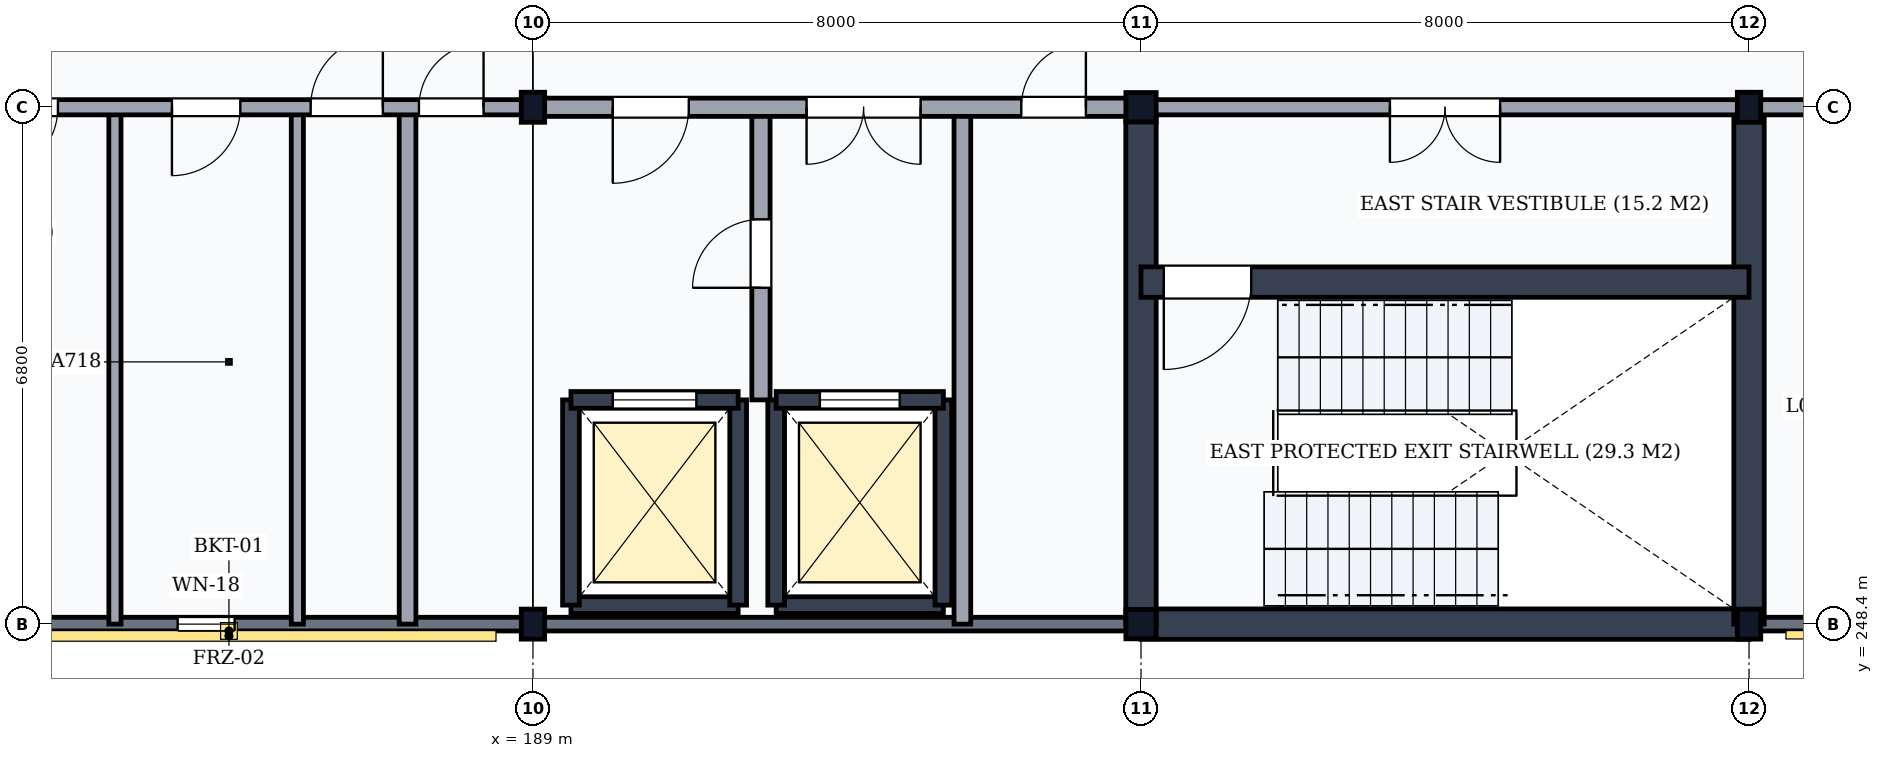
"""IFC4 building model, lengths in metres.
Left out: names, types, materials, properties, quantities, classifications, styles, units other than length and angle.
Written with IfcOpenShell. Run it as: python <this file> out.ifc"""

import sys

from ifc_helpers import new_model, si_unit, direction, frame, frame_2d, origin, origin_2d, place, context, subcontext, project, spatial, rectangle, i_section, extrude, element, fill, save


model = new_model("IFC4")
c1 = context("Model", 3, precision=1e-05, world=origin(), true_north=direction((0.0, 1.0)))
c2 = subcontext(c1, "Body", "Model", "MODEL_VIEW")
j1 = project(units=[si_unit("LENGTHUNIT", "METRE"), si_unit("PLANEANGLEUNIT", "RADIAN")], contexts=[c1])
p1 = place(None, origin())
s1 = spatial("IfcSite", under=j1, at=p1, CompositionType="ELEMENT")
p2 = place(p1, origin())
s2 = spatial("IfcBuilding", under=s1, at=p2, CompositionType="ELEMENT")
p3 = place(p2, frame((0.0, 0.0, 32.1)))
s3 = spatial("IfcBuildingStorey", under=s2, at=p3, CompositionType="ELEMENT", Elevation=32.1)
for number, where, z_axis, x_axis in (
    (1, (189.0, 248.4, 0.0), (0.0, 0.0, 1.0), (1.0, 0.0, 0.0)),
    (2, (189.0, 255.2, 0.0), (0.0, 0.0, 1.0), (1.0, 0.0, 0.0)),
):
    element("IfcColumn", number, at=place(p3, frame(where, z_axis=z_axis, x_axis=x_axis)), inside=s3, PredefinedType="COLUMN", context=c2, shape_type="SweptSolid", body=[
        extrude(i_section(OverallWidth=0.308, OverallDepth=0.395, WebThickness=0.021, FlangeThickness=0.04, FilletRadius=0.027, at=origin_2d()), origin(), (0.0, 0.0, 1.0), 3.9),
    ])
for number, where, z_axis, x_axis in (
    (3, (197.0, 248.4, 0.0), (0.0, 0.0, 1.0), (1.0, 0.0, 0.0)),
    (4, (197.0, 255.2, 0.0), (0.0, 0.0, 1.0), (1.0, 0.0, 0.0)),
):
    element("IfcColumn", number, at=place(p3, frame(where, z_axis=z_axis, x_axis=x_axis)), inside=s3, PredefinedType="COLUMN", context=c2, shape_type="SweptSolid", body=[
        extrude(i_section(OverallWidth=0.398, OverallDepth=0.387, WebThickness=0.021, FlangeThickness=0.033, FilletRadius=0.015, at=origin_2d()), origin(), (0.0, 0.0, 1.0), 3.9),
    ])
for number, where, z_axis, x_axis in (
    (5, (205.0, 248.4, 0.0), (0.0, 0.0, 1.0), (1.0, 0.0, 0.0)),
    (6, (205.0, 255.2, 0.0), (0.0, 0.0, 1.0), (1.0, 0.0, 0.0)),
):
    element("IfcColumn", number, at=place(p3, frame(where, z_axis=z_axis, x_axis=x_axis)), inside=s3, PredefinedType="COLUMN", context=c2, shape_type="SweptSolid", body=[
        extrude(i_section(OverallWidth=0.308, OverallDepth=0.395, WebThickness=0.021, FlangeThickness=0.04, FilletRadius=0.027, at=origin_2d()), origin(), (0.0, 0.0, 1.0), 3.9),
    ])
p4 = place(p3, frame((181.006, 248.4, 0.0), z_axis=(0.0, 0.0, 1.0), x_axis=(1.0, 0.0, 0.0)))
e7 = element("IfcWall", 7, at=p4, inside=s3, PredefinedType="SOLIDWALL", context=c2, shape_type="SweptSolid", body=[
    extrude(rectangle(XDim=7.988, YDim=0.18, at=frame_2d((3.994, 0.0))), origin(), (0.0, 0.0, 1.0), 3.368),
])
p5 = place(p4, frame((3.319, 0.0, 0.85)))
e8 = element("IfcOpeningElement", 8, at=p5, cuts=e7, PredefinedType="OPENING", context=c2, shape_type="SweptSolid", body=[
    extrude(rectangle(XDim=0.75, YDim=2.0, at=frame_2d((0.375, 1.0))), frame((0.0, 0.105, 0.0), z_axis=(0.0, -1.0, 0.0), x_axis=(1.0, 0.0, 0.0)), (0.0, 0.0, 1.0), 0.21),
])
p6 = place(p3, frame((189.006, 248.4, 0.0), z_axis=(0.0, 0.0, 1.0), x_axis=(1.0, 0.0, 0.0)))
e9 = element("IfcWall", 9, at=p6, inside=s3, PredefinedType="SOLIDWALL", context=c2, shape_type="SweptSolid", body=[
    extrude(rectangle(XDim=7.988, YDim=0.18, at=frame_2d((3.994, 0.0))), origin(), (0.0, 0.0, 1.0), 3.368),
])
p7 = place(p3, frame((205.006, 248.4, 0.0), z_axis=(0.0, 0.0, 1.0), x_axis=(1.0, 0.0, 0.0)))
e10 = element("IfcWall", 10, at=p7, inside=s3, PredefinedType="SOLIDWALL", context=c2, shape_type="SweptSolid", body=[
    extrude(rectangle(XDim=7.988, YDim=0.18, at=frame_2d((3.994, 0.0))), origin(), (0.0, 0.0, 1.0), 3.368),
])
p8 = place(p7, frame((3.094, 0.0, 0.95)))
e11 = element("IfcOpeningElement", 11, at=p8, cuts=e10, PredefinedType="OPENING", context=c2, shape_type="SweptSolid", body=[
    extrude(rectangle(XDim=1.8, YDim=2.0, at=frame_2d((0.9, 1.0))), frame((0.0, 0.105, 0.0), z_axis=(0.0, -1.0, 0.0), x_axis=(1.0, 0.0, 0.0)), (0.0, 0.0, 1.0), 0.21),
])
p9 = place(p3, frame((197.0, 248.4, 0.0), z_axis=(0.0, 0.0, 1.0), x_axis=(1.0, 0.0, 0.0)))
e12 = element("IfcWall", 12, at=p9, inside=s3, PredefinedType="SHEAR", context=c2, shape_type="SweptSolid", body=[
    extrude(rectangle(XDim=8.0, YDim=0.4, at=frame_2d((4.0, 0.0))), origin(), (0.0, 0.0, 1.0), 3.68),
])
for number, where, z_axis, x_axis in (
    (13, (197.0, 248.4, 0.0), (0.0, 0.0, 1.0), (0.0, 1.0, 0.0)),
    (14, (205.0, 248.4, 0.0), (0.0, 0.0, 1.0), (0.0, 1.0, 0.0)),
):
    element("IfcWall", number, at=place(p3, frame(where, z_axis=z_axis, x_axis=x_axis)), inside=s3, PredefinedType="SHEAR", context=c2, shape_type="SweptSolid", body=[
        extrude(rectangle(XDim=6.8, YDim=0.4, at=frame_2d((3.4, 0.0))), origin(), (0.0, 0.0, 1.0), 3.68),
    ])
p10 = place(p3, frame((197.0, 252.9, 0.0), z_axis=(0.0, 0.0, 1.0), x_axis=(1.0, 0.0, 0.0)))
e15 = element("IfcWall", 15, at=p10, inside=s3, PredefinedType="SHEAR", context=c2, shape_type="SweptSolid", body=[
    extrude(rectangle(XDim=8.0, YDim=0.4, at=frame_2d((4.0, 0.0))), origin(), (0.0, 0.0, 1.0), 3.68),
])
p11 = place(p10, frame((0.3, 0.0, 0.0)))
e16 = element("IfcOpeningElement", 16, at=p11, cuts=e15, PredefinedType="OPENING", context=c2, shape_type="SweptSolid", body=[
    extrude(rectangle(XDim=1.15, YDim=2.15, at=frame_2d((0.575, 1.075))), frame((0.0, 0.215, 0.0), z_axis=(0.0, -1.0, 0.0), x_axis=(1.0, 0.0, 0.0)), (0.0, 0.0, 1.0), 0.43),
])
p12 = place(p3, frame((197.0, 255.2, 0.0), z_axis=(0.0, 0.0, 1.0), x_axis=(1.0, 0.0, 0.0)))
e17 = element("IfcWall", 17, at=p12, inside=s3, PredefinedType="PARTITIONING", context=c2, shape_type="SweptSolid", body=[
    extrude(rectangle(XDim=8.0, YDim=0.2, at=frame_2d((4.0, 0.0))), origin(), (0.0, 0.0, 1.0), 3.078),
])
p13 = place(p12, frame((3.275, 0.0, 0.0)))
e18 = element("IfcOpeningElement", 18, at=p13, cuts=e17, PredefinedType="OPENING", context=c2, shape_type="SweptSolid", body=[
    extrude(rectangle(XDim=1.45, YDim=2.2, at=frame_2d((0.725, 1.1))), frame((0.0, 0.115, 0.0), z_axis=(0.0, -1.0, 0.0), x_axis=(1.0, 0.0, 0.0)), (0.0, 0.0, 1.0), 0.23),
])
p14 = place(p3, frame((189.5, 248.65, 0.0), z_axis=(0.0, 0.0, 1.0), x_axis=(1.0, 0.0, 0.0)))
e19 = element("IfcWall", 19, at=p14, inside=s3, PredefinedType="SHEAR", context=c2, shape_type="SweptSolid", body=[
    extrude(rectangle(XDim=2.2, YDim=0.22, at=frame_2d((1.1, 0.0))), origin(), (0.0, 0.0, 1.0), 3.68),
])
for number, where, z_axis, x_axis in (
    (20, (189.5, 248.65, 0.0), (0.0, 0.0, 1.0), (0.0, 1.0, 0.0)),
    (21, (191.7, 248.65, 0.0), (0.0, 0.0, 1.0), (0.0, 1.0, 0.0)),
):
    element("IfcWall", number, at=place(p3, frame(where, z_axis=z_axis, x_axis=x_axis)), inside=s3, PredefinedType="SHEAR", context=c2, shape_type="SweptSolid", body=[
        extrude(rectangle(XDim=2.7, YDim=0.22, at=frame_2d((1.35, 0.0))), origin(), (0.0, 0.0, 1.0), 3.68),
    ])
p15 = place(p3, frame((189.5, 251.35, 0.0), z_axis=(0.0, 0.0, 1.0), x_axis=(1.0, 0.0, 0.0)))
e22 = element("IfcWall", 22, at=p15, inside=s3, PredefinedType="SHEAR", context=c2, shape_type="SweptSolid", body=[
    extrude(rectangle(XDim=2.2, YDim=0.22, at=frame_2d((1.1, 0.0))), origin(), (0.0, 0.0, 1.0), 3.68),
])
p16 = place(p15, frame((0.55, 0.0, 0.0)))
e23 = element("IfcOpeningElement", 23, at=p16, cuts=e22, PredefinedType="OPENING", context=c2, shape_type="SweptSolid", body=[
    extrude(rectangle(XDim=1.1, YDim=2.15, at=frame_2d((0.55, 1.075))), frame((0.0, 0.125, 0.0), z_axis=(0.0, -1.0, 0.0), x_axis=(1.0, 0.0, 0.0)), (0.0, 0.0, 1.0), 0.25),
])
p17 = place(p3, frame((192.2, 248.65, 0.0), z_axis=(0.0, 0.0, 1.0), x_axis=(1.0, 0.0, 0.0)))
e24 = element("IfcWall", 24, at=p17, inside=s3, PredefinedType="SHEAR", context=c2, shape_type="SweptSolid", body=[
    extrude(rectangle(XDim=2.2, YDim=0.22, at=frame_2d((1.1, 0.0))), origin(), (0.0, 0.0, 1.0), 3.68),
])
for number, where, z_axis, x_axis in (
    (25, (192.2, 248.65, 0.0), (0.0, 0.0, 1.0), (0.0, 1.0, 0.0)),
    (26, (194.4, 248.65, 0.0), (0.0, 0.0, 1.0), (0.0, 1.0, 0.0)),
):
    element("IfcWall", number, at=place(p3, frame(where, z_axis=z_axis, x_axis=x_axis)), inside=s3, PredefinedType="SHEAR", context=c2, shape_type="SweptSolid", body=[
        extrude(rectangle(XDim=2.7, YDim=0.22, at=frame_2d((1.35, 0.0))), origin(), (0.0, 0.0, 1.0), 3.68),
    ])
p18 = place(p3, frame((192.2, 251.35, 0.0), z_axis=(0.0, 0.0, 1.0), x_axis=(1.0, 0.0, 0.0)))
e27 = element("IfcWall", 27, at=p18, inside=s3, PredefinedType="SHEAR", context=c2, shape_type="SweptSolid", body=[
    extrude(rectangle(XDim=2.2, YDim=0.22, at=frame_2d((1.1, 0.0))), origin(), (0.0, 0.0, 1.0), 3.68),
])
p19 = place(p18, frame((0.575, 0.0, 0.0)))
e28 = element("IfcOpeningElement", 28, at=p19, cuts=e27, PredefinedType="OPENING", context=c2, shape_type="SweptSolid", body=[
    extrude(rectangle(XDim=1.05, YDim=2.15, at=frame_2d((0.525, 1.075))), frame((0.0, 0.125, 0.0), z_axis=(0.0, -1.0, 0.0), x_axis=(1.0, 0.0, 0.0)), (0.0, 0.0, 1.0), 0.25),
])
p20 = place(p3, frame((192.0, 251.35, 0.0), z_axis=(0.0, 0.0, 1.0), x_axis=(0.0, 1.0, 0.0)))
e29 = element("IfcWall", 29, at=p20, inside=s3, PredefinedType="PARTITIONING", context=c2, shape_type="SweptSolid", body=[
    extrude(rectangle(XDim=3.85, YDim=0.24, at=frame_2d((1.925, 0.0))), origin(), (0.0, 0.0, 1.0), 3.68),
])
p21 = place(p20, frame((1.475, 0.0, 0.0)))
e30 = element("IfcOpeningElement", 30, at=p21, cuts=e29, PredefinedType="OPENING", context=c2, shape_type="SweptSolid", body=[
    extrude(rectangle(XDim=0.9, YDim=2.1, at=frame_2d((0.45, 1.05))), frame((0.0, 0.135, 0.0), z_axis=(0.0, -1.0, 0.0), x_axis=(1.0, 0.0, 0.0)), (0.0, 0.0, 1.0), 0.27),
])
p22 = place(p3, frame((194.65, 248.4, 0.0), z_axis=(0.0, 0.0, 1.0), x_axis=(0.0, 1.0, 0.0)))
e31 = element("IfcWall", 31, at=p22, inside=s3, PredefinedType="PARTITIONING", context=c2, shape_type="SweptSolid", body=[
    extrude(rectangle(XDim=6.8, YDim=0.22, at=frame_2d((3.4, 0.0))), origin(), (0.0, 0.0, 1.0), 3.68),
])
for number, where, z_axis, x_axis in (
    (32, (183.5, 248.4, 0.0), (0.0, 0.0, 1.0), (0.0, 1.0, 0.0)),
    (33, (185.9, 248.4, 0.0), (0.0, 0.0, 1.0), (0.0, 1.0, 0.0)),
):
    element("IfcWall", number, at=place(p3, frame(where, z_axis=z_axis, x_axis=x_axis)), inside=s3, PredefinedType="PARTITIONING", context=c2, shape_type="SweptSolid", body=[
        extrude(rectangle(XDim=6.8, YDim=0.16, at=frame_2d((3.4, 0.0))), origin(), (0.0, 0.0, 1.0), 3.68),
    ])
p23 = place(p3, frame((187.35, 248.4, 0.0), z_axis=(0.0, 0.0, 1.0), x_axis=(0.0, 1.0, 0.0)))
e34 = element("IfcWall", 34, at=p23, inside=s3, PredefinedType="PARTITIONING", context=c2, shape_type="SweptSolid", body=[
    extrude(rectangle(XDim=6.8, YDim=0.22, at=frame_2d((3.4, 0.0))), origin(), (0.0, 0.0, 1.0), 3.68),
])
p24 = place(p3, frame((181.0, 255.2, 0.0), z_axis=(0.0, 0.0, 1.0), x_axis=(1.0, 0.0, 0.0)))
e35 = element("IfcWall", 35, at=p24, inside=s3, PredefinedType="PARTITIONING", context=c2, shape_type="SweptSolid", body=[
    extrude(rectangle(XDim=8.0, YDim=0.2, at=frame_2d((4.0, 0.0))), origin(), (0.0, 0.0, 1.0), 3.078),
])
p25 = place(p24, frame((0.85, 0.0, 0.0)))
e36 = element("IfcOpeningElement", 36, at=p25, cuts=e35, PredefinedType="OPENING", context=c2, shape_type="SweptSolid", body=[
    extrude(rectangle(XDim=0.9, YDim=2.1, at=frame_2d((0.45, 1.05))), frame((0.0, 0.115, 0.0), z_axis=(0.0, -1.0, 0.0), x_axis=(1.0, 0.0, 0.0)), (0.0, 0.0, 1.0), 0.23),
])
p26 = place(p24, frame((3.25, 0.0, 0.0)))
e37 = element("IfcOpeningElement", 37, at=p26, cuts=e35, PredefinedType="OPENING", context=c2, shape_type="SweptSolid", body=[
    extrude(rectangle(XDim=0.9, YDim=2.1, at=frame_2d((0.45, 1.05))), frame((0.0, 0.115, 0.0), z_axis=(0.0, -1.0, 0.0), x_axis=(1.0, 0.0, 0.0)), (0.0, 0.0, 1.0), 0.23),
])
p27 = place(p24, frame((5.075, 0.0, 0.0)))
e38 = element("IfcOpeningElement", 38, at=p27, cuts=e35, PredefinedType="OPENING", context=c2, shape_type="SweptSolid", body=[
    extrude(rectangle(XDim=0.95, YDim=2.1, at=frame_2d((0.475, 1.05))), frame((0.0, 0.115, 0.0), z_axis=(0.0, -1.0, 0.0), x_axis=(1.0, 0.0, 0.0)), (0.0, 0.0, 1.0), 0.23),
])
p28 = place(p24, frame((6.5, 0.0, 0.0)))
e39 = element("IfcOpeningElement", 39, at=p28, cuts=e35, PredefinedType="OPENING", context=c2, shape_type="SweptSolid", body=[
    extrude(rectangle(XDim=0.85, YDim=2.1, at=frame_2d((0.425, 1.05))), frame((0.0, 0.115, 0.0), z_axis=(0.0, -1.0, 0.0), x_axis=(1.0, 0.0, 0.0)), (0.0, 0.0, 1.0), 0.23),
])
p29 = place(p3, frame((189.0, 255.2, 0.0), z_axis=(0.0, 0.0, 1.0), x_axis=(1.0, 0.0, 0.0)))
e40 = element("IfcWall", 40, at=p29, inside=s3, PredefinedType="PARTITIONING", context=c2, shape_type="SweptSolid", body=[
    extrude(rectangle(XDim=8.0, YDim=0.24, at=frame_2d((4.0, 0.0))), origin(), (0.0, 0.0, 1.0), 3.078),
])
p30 = place(p29, frame((1.05, 0.0, 0.0)))
e41 = element("IfcOpeningElement", 41, at=p30, cuts=e40, PredefinedType="OPENING", context=c2, shape_type="SweptSolid", body=[
    extrude(rectangle(XDim=1.0, YDim=2.1, at=frame_2d((0.5, 1.05))), frame((0.0, 0.135, 0.0), z_axis=(0.0, -1.0, 0.0), x_axis=(1.0, 0.0, 0.0)), (0.0, 0.0, 1.0), 0.27),
])
p31 = place(p29, frame((3.6, 0.0, 0.0)))
e42 = element("IfcOpeningElement", 42, at=p31, cuts=e40, PredefinedType="OPENING", context=c2, shape_type="SweptSolid", body=[
    extrude(rectangle(XDim=1.5, YDim=2.25, at=frame_2d((0.75, 1.125))), frame((0.0, 0.135, 0.0), z_axis=(0.0, -1.0, 0.0), x_axis=(1.0, 0.0, 0.0)), (0.0, 0.0, 1.0), 0.27),
])
p32 = place(p29, frame((6.425, 0.0, 0.0)))
e43 = element("IfcOpeningElement", 43, at=p32, cuts=e40, PredefinedType="OPENING", context=c2, shape_type="SweptSolid", body=[
    extrude(rectangle(XDim=0.85, YDim=2.1, at=frame_2d((0.425, 1.05))), frame((0.0, 0.135, 0.0), z_axis=(0.0, -1.0, 0.0), x_axis=(1.0, 0.0, 0.0)), (0.0, 0.0, 1.0), 0.27),
])
p33 = place(p3, frame((205.0, 255.2, 0.0), z_axis=(0.0, 0.0, 1.0), x_axis=(1.0, 0.0, 0.0)))
e44 = element("IfcWall", 44, at=p33, inside=s3, PredefinedType="PARTITIONING", context=c2, shape_type="SweptSolid", body=[
    extrude(rectangle(XDim=16.0, YDim=0.2, at=frame_2d((8.0, 0.0))), origin(), (0.0, 0.0, 1.0), 3.078),
])
p34 = place(p33, frame((3.5, 0.0, 0.0)))
e45 = element("IfcOpeningElement", 45, at=p34, cuts=e44, PredefinedType="OPENING", context=c2, shape_type="SweptSolid", body=[
    extrude(rectangle(XDim=1.0, YDim=2.1, at=frame_2d((0.5, 1.05))), frame((0.0, 0.115, 0.0), z_axis=(0.0, -1.0, 0.0), x_axis=(1.0, 0.0, 0.0)), (0.0, 0.0, 1.0), 0.23),
])
p35 = place(p33, frame((11.5, 0.0, 0.0)))
e46 = element("IfcOpeningElement", 46, at=p35, cuts=e44, PredefinedType="OPENING", context=c2, shape_type="SweptSolid", body=[
    extrude(rectangle(XDim=1.0, YDim=2.1, at=frame_2d((0.5, 1.05))), frame((0.0, 0.115, 0.0), z_axis=(0.0, -1.0, 0.0), x_axis=(1.0, 0.0, 0.0)), (0.0, 0.0, 1.0), 0.23),
])
p36 = place(p5, origin())
e47 = element("IfcWindow", 47, at=p36, inside=s3, PartitioningType="SINGLE_PANEL", PredefinedType="WINDOW", context=c2, shape_type="SweptSolid", body=[
    extrude(rectangle(XDim=0.75, YDim=2.0, at=frame_2d((0.375, 1.0))), frame((0.0, 0.03, 0.0), z_axis=(0.0, -1.0, 0.0), x_axis=(1.0, 0.0, 0.0)), (0.0, 0.0, 1.0), 0.06),
])
fill(e8, e47)
p37 = place(p11, frame((1.15, 0.0, 0.0), z_axis=(0.0, 0.0, 1.0), x_axis=(-1.0, 0.0, 0.0)))
e48 = element("IfcDoor", 48, at=p37, inside=s3, OperationType="SINGLE_SWING_RIGHT", PredefinedType="DOOR", context=c2, shape_type="SweptSolid", body=[
    extrude(rectangle(XDim=1.15, YDim=2.15, at=frame_2d((0.575, 1.075))), frame((0.0, 0.025, 0.0), z_axis=(0.0, -1.0, 0.0), x_axis=(1.0, 0.0, 0.0)), (0.0, 0.0, 1.0), 0.05),
])
fill(e16, e48)
p38 = place(p13, frame((1.45, 0.0, 0.0), z_axis=(0.0, 0.0, 1.0), x_axis=(-1.0, 0.0, 0.0)))
e49 = element("IfcDoor", 49, at=p38, inside=s3, OperationType="DOUBLE_DOOR_SINGLE_SWING", PredefinedType="DOOR", context=c2, shape_type="SweptSolid", body=[
    extrude(rectangle(XDim=1.45, YDim=2.2, at=frame_2d((0.725, 1.1))), frame((0.0, 0.025, 0.0), z_axis=(0.0, -1.0, 0.0), x_axis=(1.0, 0.0, 0.0)), (0.0, 0.0, 1.0), 0.05),
])
fill(e18, e49)
p39 = place(p16, origin())
e50 = element("IfcDoor", 50, at=p39, inside=s3, OperationType="DOUBLE_DOOR_SLIDING", PredefinedType="USERDEFINED", context=c2, shape_type="SweptSolid", body=[
    extrude(rectangle(XDim=1.1, YDim=2.15, at=frame_2d((0.55, 1.075))), frame((0.0, 0.025, 0.0), z_axis=(0.0, -1.0, 0.0), x_axis=(1.0, 0.0, 0.0)), (0.0, 0.0, 1.0), 0.05),
])
fill(e23, e50)
p40 = place(p19, origin())
e51 = element("IfcDoor", 51, at=p40, inside=s3, OperationType="DOUBLE_DOOR_SLIDING", PredefinedType="USERDEFINED", context=c2, shape_type="SweptSolid", body=[
    extrude(rectangle(XDim=1.05, YDim=2.15, at=frame_2d((0.525, 1.075))), frame((0.0, 0.025, 0.0), z_axis=(0.0, -1.0, 0.0), x_axis=(1.0, 0.0, 0.0)), (0.0, 0.0, 1.0), 0.05),
])
fill(e28, e51)
p41 = place(p21, origin())
e52 = element("IfcDoor", 52, at=p41, inside=s3, OperationType="SINGLE_SWING_LEFT", PredefinedType="DOOR", context=c2, shape_type="SweptSolid", body=[
    extrude(rectangle(XDim=0.9, YDim=2.1, at=frame_2d((0.45, 1.05))), frame((0.0, 0.025, 0.0), z_axis=(0.0, -1.0, 0.0), x_axis=(1.0, 0.0, 0.0)), (0.0, 0.0, 1.0), 0.05),
])
fill(e30, e52)
p42 = place(p25, frame((0.9, 0.0, 0.0), z_axis=(0.0, 0.0, 1.0), x_axis=(-1.0, 0.0, 0.0)))
e53 = element("IfcDoor", 53, at=p42, inside=s3, OperationType="SINGLE_SWING_RIGHT", PredefinedType="DOOR", context=c2, shape_type="SweptSolid", body=[
    extrude(rectangle(XDim=0.9, YDim=2.1, at=frame_2d((0.45, 1.05))), frame((0.0, 0.025, 0.0), z_axis=(0.0, -1.0, 0.0), x_axis=(1.0, 0.0, 0.0)), (0.0, 0.0, 1.0), 0.05),
])
fill(e36, e53)
p43 = place(p26, frame((0.9, 0.0, 0.0), z_axis=(0.0, 0.0, 1.0), x_axis=(-1.0, 0.0, 0.0)))
e54 = element("IfcDoor", 54, at=p43, inside=s3, OperationType="SINGLE_SWING_RIGHT", PredefinedType="DOOR", context=c2, shape_type="SweptSolid", body=[
    extrude(rectangle(XDim=0.9, YDim=2.1, at=frame_2d((0.45, 1.05))), frame((0.0, 0.025, 0.0), z_axis=(0.0, -1.0, 0.0), x_axis=(1.0, 0.0, 0.0)), (0.0, 0.0, 1.0), 0.05),
])
fill(e37, e54)
p44 = place(p27, frame((0.95, 0.0, 0.0), z_axis=(0.0, 0.0, 1.0), x_axis=(-1.0, 0.0, 0.0)))
e55 = element("IfcDoor", 55, at=p44, inside=s3, OperationType="SINGLE_SWING_LEFT", PredefinedType="DOOR", context=c2, shape_type="SweptSolid", body=[
    extrude(rectangle(XDim=0.95, YDim=2.1, at=frame_2d((0.475, 1.05))), frame((0.0, 0.025, 0.0), z_axis=(0.0, -1.0, 0.0), x_axis=(1.0, 0.0, 0.0)), (0.0, 0.0, 1.0), 0.05),
])
fill(e38, e55)
p45 = place(p28, frame((0.85, 0.0, 0.0), z_axis=(0.0, 0.0, 1.0), x_axis=(-1.0, 0.0, 0.0)))
e56 = element("IfcDoor", 56, at=p45, inside=s3, OperationType="SINGLE_SWING_LEFT", PredefinedType="DOOR", context=c2, shape_type="SweptSolid", body=[
    extrude(rectangle(XDim=0.85, YDim=2.1, at=frame_2d((0.425, 1.05))), frame((0.0, 0.025, 0.0), z_axis=(0.0, -1.0, 0.0), x_axis=(1.0, 0.0, 0.0)), (0.0, 0.0, 1.0), 0.05),
])
fill(e39, e56)
p46 = place(p30, frame((1.0, 0.0, 0.0), z_axis=(0.0, 0.0, 1.0), x_axis=(-1.0, 0.0, 0.0)))
e57 = element("IfcDoor", 57, at=p46, inside=s3, OperationType="SINGLE_SWING_RIGHT", PredefinedType="DOOR", context=c2, shape_type="SweptSolid", body=[
    extrude(rectangle(XDim=1.0, YDim=2.1, at=frame_2d((0.5, 1.05))), frame((0.0, 0.025, 0.0), z_axis=(0.0, -1.0, 0.0), x_axis=(1.0, 0.0, 0.0)), (0.0, 0.0, 1.0), 0.05),
])
fill(e41, e57)
p47 = place(p31, frame((1.5, 0.0, 0.0), z_axis=(0.0, 0.0, 1.0), x_axis=(-1.0, 0.0, 0.0)))
e58 = element("IfcDoor", 58, at=p47, inside=s3, OperationType="DOUBLE_DOOR_SINGLE_SWING", PredefinedType="DOOR", context=c2, shape_type="SweptSolid", body=[
    extrude(rectangle(XDim=1.5, YDim=2.25, at=frame_2d((0.75, 1.125))), frame((0.0, 0.025, 0.0), z_axis=(0.0, -1.0, 0.0), x_axis=(1.0, 0.0, 0.0)), (0.0, 0.0, 1.0), 0.05),
])
fill(e42, e58)
p48 = place(p32, frame((0.85, 0.0, 0.0), z_axis=(0.0, 0.0, 1.0), x_axis=(-1.0, 0.0, 0.0)))
e59 = element("IfcDoor", 59, at=p48, inside=s3, OperationType="SINGLE_SWING_LEFT", PredefinedType="DOOR", context=c2, shape_type="SweptSolid", body=[
    extrude(rectangle(XDim=0.85, YDim=2.1, at=frame_2d((0.425, 1.05))), frame((0.0, 0.025, 0.0), z_axis=(0.0, -1.0, 0.0), x_axis=(1.0, 0.0, 0.0)), (0.0, 0.0, 1.0), 0.05),
])
fill(e43, e59)
save(model, sys.argv[1])
